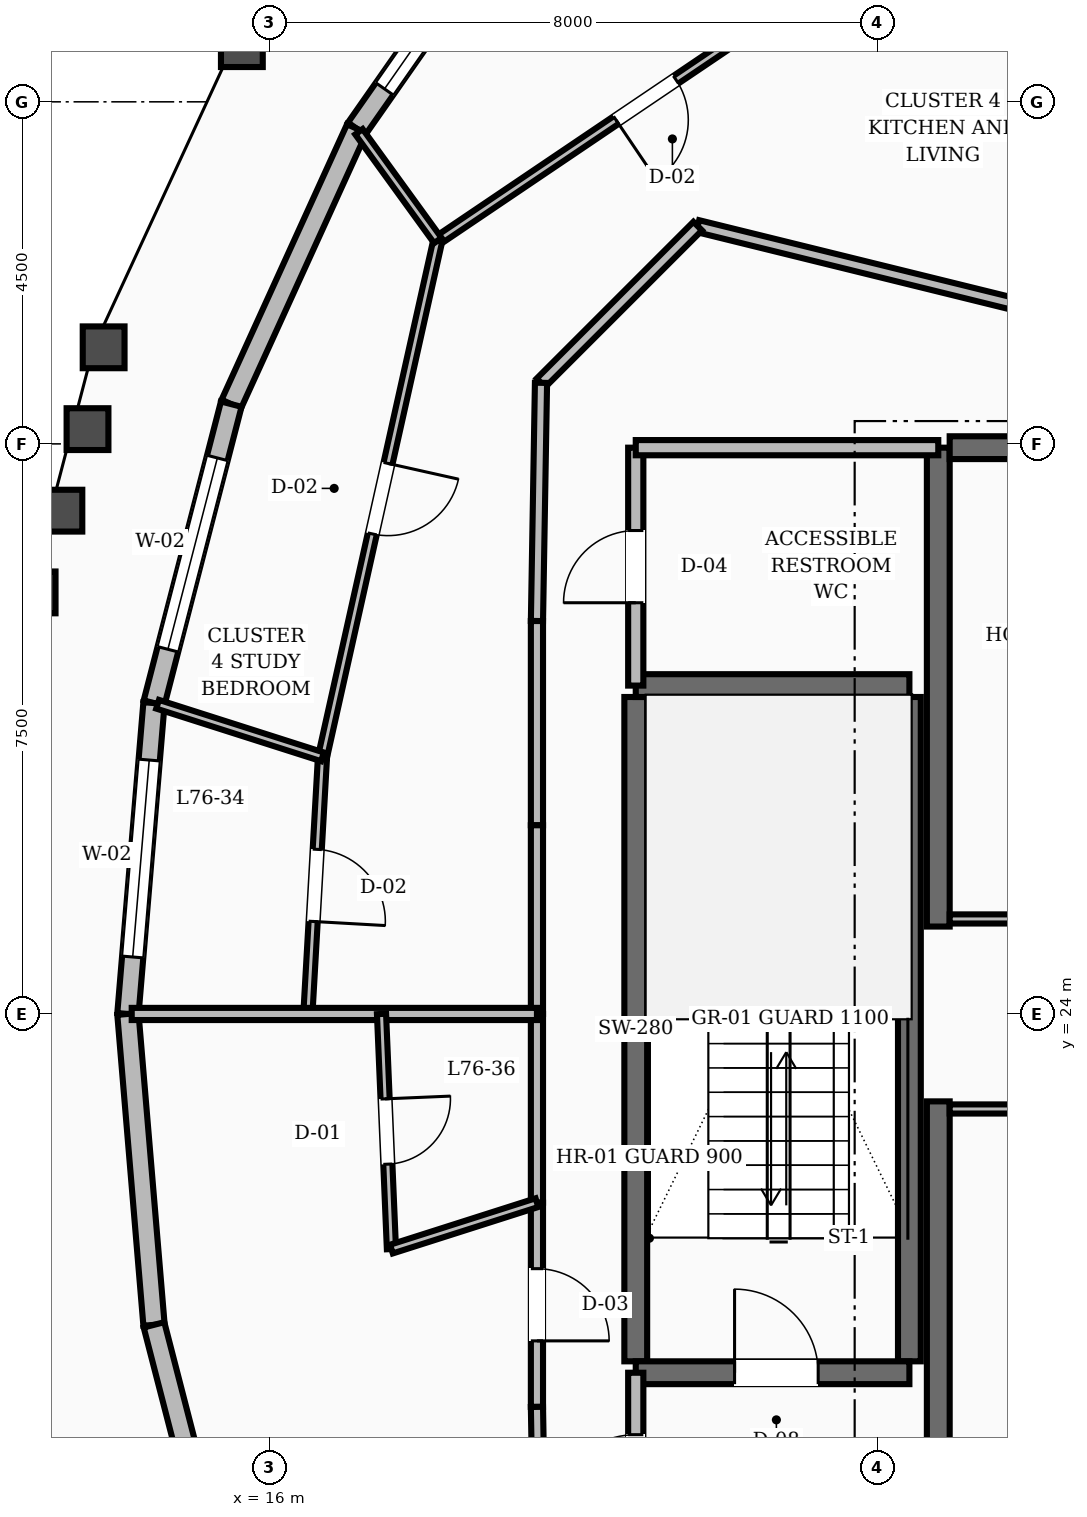
"""IFC4 building model, lengths in metres.
Left out: names, types, materials, properties, quantities, classifications, styles, units other than length and angle.
Written with IfcOpenShell. Run it as: python <this file> out.ifc"""

import sys

from ifc_helpers import new_model, si_unit, direction, frame, frame_2d, origin, place, context, subcontext, project, spatial, rectangle, extrude, element, fill, save


model = new_model("IFC4")
c1 = context("Model", 3, precision=1e-05, world=origin(), true_north=direction((0.0, 1.0)))
c2 = subcontext(c1, "Body", "Model", "MODEL_VIEW")
j1 = project(units=[si_unit("LENGTHUNIT", "METRE"), si_unit("PLANEANGLEUNIT", "RADIAN")], contexts=[c1])
p1 = place(None, origin())
s1 = spatial("IfcSite", under=j1, at=p1, CompositionType="ELEMENT")
p2 = place(p1, origin())
s2 = spatial("IfcBuilding", under=s1, at=p2, CompositionType="ELEMENT")
p3 = place(p2, frame((0.0, 0.0, 290.4)))
s3 = spatial("IfcBuildingStorey", under=s2, at=p3, CompositionType="ELEMENT", Elevation=290.4)
for number, where, z_axis, x_axis in (
    (1, (24.8, 16.55, 0.0), (0.0, 0.0, 1.0), (0.0, 1.0, 0.0)),
    (2, (24.8, 25.15, 0.0), (0.0, 0.0, 1.0), (0.0, 1.0, 0.0)),
):
    element("IfcWall", number, at=place(p3, frame(where, z_axis=z_axis, x_axis=x_axis)), inside=s3, PredefinedType="SHEAR", context=c2, shape_type="SweptSolid", body=[
        extrude(rectangle(XDim=6.3, YDim=0.3, at=frame_2d((3.15, 0.0))), origin(), (0.0, 0.0, 1.0), 3.6),
    ])
p4 = place(p3, frame((24.95, 31.45, 0.0), z_axis=(0.0, 0.0, 1.0), x_axis=(1.0, 0.0, 0.0)))
e3 = element("IfcWall", 3, at=p4, inside=s3, PredefinedType="SHEAR", context=c2, shape_type="SweptSolid", body=[
    extrude(rectangle(XDim=3.25, YDim=0.3, at=frame_2d((1.625, 0.0))), origin(), (0.0, 0.0, 1.0), 3.6),
])
for number, where, z_axis, x_axis in (
    (4, (20.82, 19.43, 0.0), (0.0, 0.0, 1.0), (0.0, 1.0, 0.0)),
    (5, (24.42, 19.43, 0.0), (0.0, 0.0, 1.0), (0.0, 1.0, 0.0)),
):
    element("IfcWall", number, at=place(p3, frame(where, z_axis=z_axis, x_axis=x_axis)), inside=s3, PredefinedType="SHEAR", context=c2, shape_type="SweptSolid", body=[
        extrude(rectangle(XDim=8.74, YDim=0.3, at=frame_2d((4.37, 0.0))), origin(), (0.0, 0.0, 1.0), 3.6),
    ])
p5 = place(p3, frame((20.82, 19.28, 0.0), z_axis=(0.0, 0.0, 1.0), x_axis=(1.0, 0.0, 0.0)))
e6 = element("IfcWall", 6, at=p5, inside=s3, PredefinedType="SHEAR", context=c2, shape_type="SweptSolid", body=[
    extrude(rectangle(XDim=3.6, YDim=0.3, at=frame_2d((1.8, 0.0))), origin(), (0.0, 0.0, 1.0), 3.6),
])
p6 = place(p5, frame((1.3, 0.0, 0.0)))
e7 = element("IfcOpeningElement", 7, at=p6, cuts=e6, PredefinedType="OPENING", context=c2, shape_type="SweptSolid", body=[
    extrude(rectangle(XDim=1.1, YDim=2.1, at=frame_2d((0.55, 1.05))), frame((0.0, 0.16, 0.0), z_axis=(0.0, -1.0, 0.0), x_axis=(1.0, 0.0, 0.0)), (0.0, 0.0, 1.0), 0.32),
])
p7 = place(p3, frame((20.82, 28.32, 0.0), z_axis=(0.0, 0.0, 1.0), x_axis=(1.0, 0.0, 0.0)))
e8 = element("IfcWall", 8, at=p7, inside=s3, PredefinedType="SHEAR", context=c2, shape_type="SweptSolid", body=[
    extrude(rectangle(XDim=3.6, YDim=0.3, at=frame_2d((1.8, 0.0))), origin(), (0.0, 0.0, 1.0), 3.6),
])
p8 = place(p3, frame((19.37, 38.824, 0.0), z_axis=(0.0, 0.0, 1.0), x_axis=(-0.573022646369, -0.819539533365, 0.0)))
e9 = element("IfcWall", 9, at=p8, inside=s3, PredefinedType="STANDARD", context=c2, shape_type="SweptSolid", body=[
    extrude(rectangle(XDim=3.876, YDim=0.28, at=frame_2d((1.938, 0.0))), origin(), (0.0, 0.0, 1.0), 2.88),
])
p9 = place(p8, frame((0.638, 0.0, 0.8)))
e10 = element("IfcOpeningElement", 10, at=p9, cuts=e9, PredefinedType="OPENING", context=c2, shape_type="SweptSolid", body=[
    extrude(rectangle(XDim=2.6, YDim=1.65, at=frame_2d((1.3, 0.825))), frame((0.0, 0.15, 0.0), z_axis=(0.0, -1.0, 0.0), x_axis=(1.0, 0.0, 0.0)), (0.0, 0.0, 1.0), 0.3),
])
p10 = place(p3, frame((17.149, 35.647, 0.0), z_axis=(0.0, 0.0, 1.0), x_axis=(-0.414454053433, -0.910070237725, 0.0)))
e11 = element("IfcWall", 11, at=p10, inside=s3, PredefinedType="STANDARD", context=c2, shape_type="SweptSolid", body=[
    extrude(rectangle(XDim=3.983, YDim=0.28, at=frame_2d((1.991, 0.0))), origin(), (0.0, 0.0, 1.0), 2.88),
])
p11 = place(p3, frame((15.498, 32.023, 0.0), z_axis=(0.0, 0.0, 1.0), x_axis=(-0.250207014881, -0.968192361932, 0.0)))
e12 = element("IfcWall", 12, at=p11, inside=s3, PredefinedType="STANDARD", context=c2, shape_type="SweptSolid", body=[
    extrude(rectangle(XDim=4.062, YDim=0.28, at=frame_2d((2.031, 0.0))), origin(), (0.0, 0.0, 1.0), 2.88),
])
p12 = place(p11, frame((0.731, 0.0, 0.8)))
e13 = element("IfcOpeningElement", 13, at=p12, cuts=e12, PredefinedType="OPENING", context=c2, shape_type="SweptSolid", body=[
    extrude(rectangle(XDim=2.6, YDim=1.65, at=frame_2d((1.3, 0.825))), frame((0.0, 0.15, 0.0), z_axis=(0.0, -1.0, 0.0), x_axis=(1.0, 0.0, 0.0)), (0.0, 0.0, 1.0), 0.3),
])
p13 = place(p3, frame((14.482, 28.09, 0.0), z_axis=(0.0, 0.0, 1.0), x_axis=(-0.083636215003, -0.996496354002, 0.0)))
e14 = element("IfcWall", 14, at=p13, inside=s3, PredefinedType="STANDARD", context=c2, shape_type="SweptSolid", body=[
    extrude(rectangle(XDim=4.104, YDim=0.28, at=frame_2d((2.052, 0.0))), origin(), (0.0, 0.0, 1.0), 2.88),
])
p14 = place(p13, frame((0.752, 0.0, 0.8)))
e15 = element("IfcOpeningElement", 15, at=p14, cuts=e14, PredefinedType="OPENING", context=c2, shape_type="SweptSolid", body=[
    extrude(rectangle(XDim=2.6, YDim=1.65, at=frame_2d((1.3, 0.825))), frame((0.0, 0.15, 0.0), z_axis=(0.0, -1.0, 0.0), x_axis=(1.0, 0.0, 0.0)), (0.0, 0.0, 1.0), 0.3),
])
p15 = place(p3, frame((14.139, 24.0, 0.0), z_axis=(0.0, 0.0, 1.0), x_axis=(0.083636215003, -0.996496354002, 0.0)))
e16 = element("IfcWall", 16, at=p15, inside=s3, PredefinedType="STANDARD", context=c2, shape_type="SweptSolid", body=[
    extrude(rectangle(XDim=4.104, YDim=0.28, at=frame_2d((2.052, 0.0))), origin(), (0.0, 0.0, 1.0), 2.88),
])
p16 = place(p3, frame((14.482, 19.91, 0.0), z_axis=(0.0, 0.0, 1.0), x_axis=(0.250207014881, -0.968192361932, 0.0)))
e17 = element("IfcWall", 17, at=p16, inside=s3, PredefinedType="STANDARD", context=c2, shape_type="SweptSolid", body=[
    extrude(rectangle(XDim=4.062, YDim=0.28, at=frame_2d((2.031, 0.0))), origin(), (0.0, 0.0, 1.0), 2.88),
])
p17 = place(p3, frame((20.82, 16.55, 0.0), z_axis=(0.0, 0.0, 1.0), x_axis=(0.0, 1.0, 0.0)))
e18 = element("IfcWall", 18, at=p17, inside=s3, PredefinedType="SOLIDWALL", context=c2, shape_type="SweptSolid", body=[
    extrude(rectangle(XDim=2.73, YDim=0.2, at=frame_2d((1.365, 0.0))), origin(), (0.0, 0.0, 1.0), 2.87),
])
p18 = place(p17, frame((0.815, 0.0, 0.0)))
e19 = element("IfcOpeningElement", 19, at=p18, cuts=e18, PredefinedType="OPENING", context=c2, shape_type="SweptSolid", body=[
    extrude(rectangle(XDim=1.1, YDim=2.1, at=frame_2d((0.55, 1.05))), frame((0.0, 0.11, 0.0), z_axis=(0.0, -1.0, 0.0), x_axis=(1.0, 0.0, 0.0)), (0.0, 0.0, 1.0), 0.22),
])
p19 = place(p3, frame((20.82, 28.32, 0.0), z_axis=(0.0, 0.0, 1.0), x_axis=(0.0, 1.0, 0.0)))
e20 = element("IfcWall", 20, at=p19, inside=s3, PredefinedType="SOLIDWALL", context=c2, shape_type="SweptSolid", body=[
    extrude(rectangle(XDim=3.13, YDim=0.2, at=frame_2d((1.565, 0.0))), origin(), (0.0, 0.0, 1.0), 2.87),
])
p20 = place(p19, frame((1.09, 0.0, 0.0)))
e21 = element("IfcOpeningElement", 21, at=p20, cuts=e20, PredefinedType="OPENING", context=c2, shape_type="SweptSolid", body=[
    extrude(rectangle(XDim=0.95, YDim=2.1, at=frame_2d((0.475, 1.05))), frame((0.0, 0.11, 0.0), z_axis=(0.0, -1.0, 0.0), x_axis=(1.0, 0.0, 0.0)), (0.0, 0.0, 1.0), 0.22),
])
p21 = place(p3, frame((20.82, 31.45, 0.0), z_axis=(0.0, 0.0, 1.0), x_axis=(1.0, 0.0, 0.0)))
e22 = element("IfcWall", 22, at=p21, inside=s3, PredefinedType="SOLIDWALL", context=c2, shape_type="SweptSolid", body=[
    extrude(rectangle(XDim=3.98, YDim=0.2, at=frame_2d((1.99, 0.0))), origin(), (0.0, 0.0, 1.0), 2.87),
])
p22 = place(p3, frame((24.95, 25.25, 0.0), z_axis=(0.0, 0.0, 1.0), x_axis=(1.0, 0.0, 0.0)))
e23 = element("IfcWall", 23, at=p22, inside=s3, PredefinedType="PARTITIONING", context=c2, shape_type="SweptSolid", body=[
    extrude(rectangle(XDim=3.2, YDim=0.12, at=frame_2d((1.6, 0.0))), origin(), (0.0, 0.0, 1.0), 2.87),
])
p23 = place(p22, frame((1.125, 0.0, 0.0)))
e24 = element("IfcOpeningElement", 24, at=p23, cuts=e23, PredefinedType="OPENING", context=c2, shape_type="SweptSolid", body=[
    extrude(rectangle(XDim=0.95, YDim=2.1, at=frame_2d((0.475, 1.05))), frame((0.0, 0.07, 0.0), z_axis=(0.0, -1.0, 0.0), x_axis=(1.0, 0.0, 0.0)), (0.0, 0.0, 1.0), 0.14),
])
p24 = place(p3, frame((24.95, 22.75, 0.0), z_axis=(0.0, 0.0, 1.0), x_axis=(1.0, 0.0, 0.0)))
e25 = element("IfcWall", 25, at=p24, inside=s3, PredefinedType="PARTITIONING", context=c2, shape_type="SweptSolid", body=[
    extrude(rectangle(XDim=3.2, YDim=0.12, at=frame_2d((1.6, 0.0))), origin(), (0.0, 0.0, 1.0), 2.87),
])
p25 = place(p24, frame((1.125, 0.0, 0.0)))
e26 = element("IfcOpeningElement", 26, at=p25, cuts=e25, PredefinedType="OPENING", context=c2, shape_type="SweptSolid", body=[
    extrude(rectangle(XDim=0.95, YDim=2.1, at=frame_2d((0.475, 1.05))), frame((0.0, 0.07, 0.0), z_axis=(0.0, -1.0, 0.0), x_axis=(1.0, 0.0, 0.0)), (0.0, 0.0, 1.0), 0.14),
])
p26 = place(p3, frame((25.752, 33.35, 0.0), z_axis=(0.0, 0.0, 1.0), x_axis=(-0.970939799552, 0.239323850978, 0.0)))
e27 = element("IfcWall", 27, at=p26, inside=s3, PredefinedType="SOLIDWALL", context=c2, shape_type="SweptSolid", body=[
    extrude(rectangle(XDim=4.241, YDim=0.16, at=frame_2d((2.12, 0.0))), origin(), (0.0, 0.0, 1.0), 2.87),
])
p27 = place(p3, frame((21.635, 34.365, 0.0), z_axis=(0.0, 0.0, 1.0), x_axis=(-0.707106781187, -0.707106781187, 0.0)))
e28 = element("IfcWall", 28, at=p27, inside=s3, PredefinedType="SOLIDWALL", context=c2, shape_type="SweptSolid", body=[
    extrude(rectangle(XDim=2.916, YDim=0.16, at=frame_2d((1.458, 0.0))), origin(), (0.0, 0.0, 1.0), 2.87),
])
p28 = place(p3, frame((19.573, 32.303, 0.0), z_axis=(0.0, 0.0, 1.0), x_axis=(-0.016981035134, -0.999855811828, 0.0)))
e29 = element("IfcWall", 29, at=p28, inside=s3, PredefinedType="SOLIDWALL", context=c2, shape_type="SweptSolid", body=[
    extrude(rectangle(XDim=3.134, YDim=0.16, at=frame_2d((1.567, 0.0))), origin(), (0.0, 0.0, 1.0), 2.87),
])
p29 = place(p3, frame((19.52, 29.169, 0.0), z_axis=(0.0, 0.0, 1.0), x_axis=(0.0, -1.0, 0.0)))
e30 = element("IfcWall", 30, at=p29, inside=s3, PredefinedType="SOLIDWALL", context=c2, shape_type="SweptSolid", body=[
    extrude(rectangle(XDim=2.687, YDim=0.16, at=frame_2d((1.344, 0.0))), origin(), (0.0, 0.0, 1.0), 2.87),
])
for number, where, z_axis, x_axis in (
    (31, (19.52, 26.482, 0.0), (0.0, 0.0, 1.0), (0.0, -1.0, 0.0)),
    (32, (19.52, 24.0, 0.0), (0.0, 0.0, 1.0), (0.0, -1.0, 0.0)),
):
    element("IfcWall", number, at=place(p3, frame(where, z_axis=z_axis, x_axis=x_axis)), inside=s3, PredefinedType="SOLIDWALL", context=c2, shape_type="SweptSolid", body=[
        extrude(rectangle(XDim=2.482, YDim=0.16, at=frame_2d((1.241, 0.0))), origin(), (0.0, 0.0, 1.0), 2.87),
    ])
p30 = place(p3, frame((19.52, 21.518, 0.0), z_axis=(0.0, 0.0, 1.0), x_axis=(0.0, -1.0, 0.0)))
e33 = element("IfcWall", 33, at=p30, inside=s3, PredefinedType="SOLIDWALL", context=c2, shape_type="SweptSolid", body=[
    extrude(rectangle(XDim=2.687, YDim=0.16, at=frame_2d((1.344, 0.0))), origin(), (0.0, 0.0, 1.0), 2.87),
])
p31 = place(p30, frame((0.868, 0.0, 0.0)))
e34 = element("IfcOpeningElement", 34, at=p31, cuts=e33, PredefinedType="OPENING", context=c2, shape_type="SweptSolid", body=[
    extrude(rectangle(XDim=0.95, YDim=2.1, at=frame_2d((0.475, 1.05))), frame((0.0, 0.09, 0.0), z_axis=(0.0, -1.0, 0.0), x_axis=(1.0, 0.0, 0.0)), (0.0, 0.0, 1.0), 0.18),
])
p32 = place(p3, frame((19.52, 18.831, 0.0), z_axis=(0.0, 0.0, 1.0), x_axis=(0.016981035134, -0.999855811828, 0.0)))
e35 = element("IfcWall", 35, at=p32, inside=s3, PredefinedType="SOLIDWALL", context=c2, shape_type="SweptSolid", body=[
    extrude(rectangle(XDim=3.134, YDim=0.16, at=frame_2d((1.567, 0.0))), origin(), (0.0, 0.0, 1.0), 2.87),
])
p33 = place(p3, frame((23.694, 37.875, 0.0), z_axis=(0.0, 0.0, 1.0), x_axis=(-0.82872877639, -0.55965044017, 0.0)))
e36 = element("IfcWall", 36, at=p33, inside=s3, PredefinedType="PARTITIONING", context=c2, shape_type="SweptSolid", body=[
    extrude(rectangle(XDim=6.611, YDim=0.12, at=frame_2d((3.305, 0.0))), origin(), (0.0, 0.0, 1.0), 2.87),
])
p34 = place(p33, frame((2.83, 0.0, 0.0)))
e37 = element("IfcOpeningElement", 37, at=p34, cuts=e36, PredefinedType="OPENING", context=c2, shape_type="SweptSolid", body=[
    extrude(rectangle(XDim=0.95, YDim=2.1, at=frame_2d((0.475, 1.05))), frame((0.0, 0.07, 0.0), z_axis=(0.0, -1.0, 0.0), x_axis=(1.0, 0.0, 0.0)), (0.0, 0.0, 1.0), 0.14),
])
p35 = place(p3, frame((18.216, 34.176, 0.0), z_axis=(0.0, 0.0, 1.0), x_axis=(-0.217921941181, -0.975966202054, 0.0)))
e38 = element("IfcWall", 38, at=p35, inside=s3, PredefinedType="PARTITIONING", context=c2, shape_type="SweptSolid", body=[
    extrude(rectangle(XDim=6.96, YDim=0.12, at=frame_2d((3.48, 0.0))), origin(), (0.0, 0.0, 1.0), 2.87),
])
p36 = place(p35, frame((3.005, 0.0, 0.0)))
e39 = element("IfcOpeningElement", 39, at=p36, cuts=e38, PredefinedType="OPENING", context=c2, shape_type="SweptSolid", body=[
    extrude(rectangle(XDim=0.95, YDim=2.1, at=frame_2d((0.475, 1.05))), frame((0.0, 0.07, 0.0), z_axis=(0.0, -1.0, 0.0), x_axis=(1.0, 0.0, 0.0)), (0.0, 0.0, 1.0), 0.14),
])
p37 = place(p3, frame((18.216, 34.176, 0.0), z_axis=(0.0, 0.0, 1.0), x_axis=(-0.586947198649, 0.809625213292, 0.0)))
e40 = element("IfcWall", 40, at=p37, inside=s3, PredefinedType="PARTITIONING", context=c2, shape_type="SweptSolid", body=[
    extrude(rectangle(XDim=1.767, YDim=0.12, at=frame_2d((0.884, 0.0))), origin(), (0.0, 0.0, 1.0), 2.87),
])
p38 = place(p3, frame((16.699, 27.383, 0.0), z_axis=(0.0, 0.0, 1.0), x_axis=(-0.056711181709, -0.998390625892, 0.0)))
e41 = element("IfcWall", 41, at=p38, inside=s3, PredefinedType="PARTITIONING", context=c2, shape_type="SweptSolid", body=[
    extrude(rectangle(XDim=3.388, YDim=0.12, at=frame_2d((1.694, 0.0))), origin(), (0.0, 0.0, 1.0), 2.87),
])
p39 = place(p38, frame((1.219, 0.0, 0.0)))
e42 = element("IfcOpeningElement", 42, at=p39, cuts=e41, PredefinedType="OPENING", context=c2, shape_type="SweptSolid", body=[
    extrude(rectangle(XDim=0.95, YDim=2.1, at=frame_2d((0.475, 1.05))), frame((0.0, 0.07, 0.0), z_axis=(0.0, -1.0, 0.0), x_axis=(1.0, 0.0, 0.0)), (0.0, 0.0, 1.0), 0.14),
])
p40 = place(p3, frame((16.699, 27.383, 0.0), z_axis=(0.0, 0.0, 1.0), x_axis=(-0.952679032729, 0.303978059402, 0.0)))
e43 = element("IfcWall", 43, at=p40, inside=s3, PredefinedType="PARTITIONING", context=c2, shape_type="SweptSolid", body=[
    extrude(rectangle(XDim=2.277, YDim=0.12, at=frame_2d((1.138, 0.0))), origin(), (0.0, 0.0, 1.0), 2.87),
])
p41 = place(p3, frame((19.52, 24.0, 0.0), z_axis=(0.0, 0.0, 1.0), x_axis=(-1.0, 0.0, 0.0)))
e44 = element("IfcWall", 44, at=p41, inside=s3, PredefinedType="SOLIDWALL", context=c2, shape_type="SweptSolid", body=[
    extrude(rectangle(XDim=5.331, YDim=0.16, at=frame_2d((2.666, 0.0))), origin(), (0.0, 0.0, 1.0), 2.87),
])
p42 = place(p3, frame((17.475, 24.0, 0.0), z_axis=(0.0, 0.0, 1.0), x_axis=(0.042109419469, -0.999113005016, 0.0)))
e45 = element("IfcWall", 45, at=p42, inside=s3, PredefinedType="PARTITIONING", context=c2, shape_type="SweptSolid", body=[
    extrude(rectangle(XDim=3.096, YDim=0.12, at=frame_2d((1.548, 0.0))), origin(), (0.0, 0.0, 1.0), 2.87),
])
p43 = place(p42, frame((1.118, 0.0, 0.0)))
e46 = element("IfcOpeningElement", 46, at=p43, cuts=e45, PredefinedType="OPENING", context=c2, shape_type="SweptSolid", body=[
    extrude(rectangle(XDim=0.86, YDim=2.1, at=frame_2d((0.43, 1.05))), frame((0.0, 0.07, 0.0), z_axis=(0.0, -1.0, 0.0), x_axis=(1.0, 0.0, 0.0)), (0.0, 0.0, 1.0), 0.14),
])
p44 = place(p3, frame((19.52, 21.518, 0.0), z_axis=(0.0, 0.0, 1.0), x_axis=(-0.952686159799, -0.303955721986, 0.0)))
e47 = element("IfcWall", 47, at=p44, inside=s3, PredefinedType="PARTITIONING", context=c2, shape_type="SweptSolid", body=[
    extrude(rectangle(XDim=2.01, YDim=0.12, at=frame_2d((1.005, 0.0))), origin(), (0.0, 0.0, 1.0), 2.87),
])
p45 = place(p9, origin())
e48 = element("IfcWindow", 48, at=p45, inside=s3, PartitioningType="SINGLE_PANEL", PredefinedType="WINDOW", context=c2, shape_type="SweptSolid", body=[
    extrude(rectangle(XDim=2.6, YDim=1.65, at=frame_2d((1.3, 0.825))), frame((0.0, 0.03, 0.0), z_axis=(0.0, -1.0, 0.0), x_axis=(1.0, 0.0, 0.0)), (0.0, 0.0, 1.0), 0.06),
])
fill(e10, e48)
p46 = place(p12, origin())
e49 = element("IfcWindow", 49, at=p46, inside=s3, PartitioningType="SINGLE_PANEL", PredefinedType="WINDOW", context=c2, shape_type="SweptSolid", body=[
    extrude(rectangle(XDim=2.6, YDim=1.65, at=frame_2d((1.3, 0.825))), frame((0.0, 0.03, 0.0), z_axis=(0.0, -1.0, 0.0), x_axis=(1.0, 0.0, 0.0)), (0.0, 0.0, 1.0), 0.06),
])
fill(e13, e49)
p47 = place(p14, origin())
e50 = element("IfcWindow", 50, at=p47, inside=s3, PartitioningType="SINGLE_PANEL", PredefinedType="WINDOW", context=c2, shape_type="SweptSolid", body=[
    extrude(rectangle(XDim=2.6, YDim=1.65, at=frame_2d((1.3, 0.825))), frame((0.0, 0.03, 0.0), z_axis=(0.0, -1.0, 0.0), x_axis=(1.0, 0.0, 0.0)), (0.0, 0.0, 1.0), 0.06),
])
fill(e15, e50)
p48 = place(p6, origin())
e51 = element("IfcDoor", 51, at=p48, inside=s3, OperationType="SINGLE_SWING_LEFT", PredefinedType="DOOR", context=c2, shape_type="SweptSolid", body=[
    extrude(rectangle(XDim=1.1, YDim=2.1, at=frame_2d((0.55, 1.05))), frame((0.0, 0.025, 0.0), z_axis=(0.0, -1.0, 0.0), x_axis=(1.0, 0.0, 0.0)), (0.0, 0.0, 1.0), 0.05),
])
fill(e7, e51)
p49 = place(p18, origin())
e52 = element("IfcDoor", 52, at=p49, inside=s3, OperationType="SINGLE_SWING_LEFT", PredefinedType="DOOR", context=c2, shape_type="SweptSolid", body=[
    extrude(rectangle(XDim=1.1, YDim=2.1, at=frame_2d((0.55, 1.05))), frame((0.0, 0.025, 0.0), z_axis=(0.0, -1.0, 0.0), x_axis=(1.0, 0.0, 0.0)), (0.0, 0.0, 1.0), 0.05),
])
fill(e19, e52)
p50 = place(p20, origin())
e53 = element("IfcDoor", 53, at=p50, inside=s3, OperationType="SINGLE_SWING_LEFT", PredefinedType="DOOR", context=c2, shape_type="SweptSolid", body=[
    extrude(rectangle(XDim=0.95, YDim=2.1, at=frame_2d((0.475, 1.05))), frame((0.0, 0.025, 0.0), z_axis=(0.0, -1.0, 0.0), x_axis=(1.0, 0.0, 0.0)), (0.0, 0.0, 1.0), 0.05),
])
fill(e21, e53)
p51 = place(p34, origin())
e54 = element("IfcDoor", 54, at=p51, inside=s3, OperationType="SINGLE_SWING_RIGHT", PredefinedType="DOOR", context=c2, shape_type="SweptSolid", body=[
    extrude(rectangle(XDim=0.95, YDim=2.1, at=frame_2d((0.475, 1.05))), frame((0.0, 0.025, 0.0), z_axis=(0.0, -1.0, 0.0), x_axis=(1.0, 0.0, 0.0)), (0.0, 0.0, 1.0), 0.05),
])
fill(e37, e54)
p52 = place(p36, origin())
e55 = element("IfcDoor", 55, at=p52, inside=s3, OperationType="SINGLE_SWING_LEFT", PredefinedType="DOOR", context=c2, shape_type="SweptSolid", body=[
    extrude(rectangle(XDim=0.95, YDim=2.1, at=frame_2d((0.475, 1.05))), frame((0.0, 0.025, 0.0), z_axis=(0.0, -1.0, 0.0), x_axis=(1.0, 0.0, 0.0)), (0.0, 0.0, 1.0), 0.05),
])
fill(e39, e55)
p53 = place(p39, origin())
e56 = element("IfcDoor", 56, at=p53, inside=s3, OperationType="SINGLE_SWING_RIGHT", PredefinedType="DOOR", context=c2, shape_type="SweptSolid", body=[
    extrude(rectangle(XDim=0.95, YDim=2.1, at=frame_2d((0.475, 1.05))), frame((0.0, 0.025, 0.0), z_axis=(0.0, -1.0, 0.0), x_axis=(1.0, 0.0, 0.0)), (0.0, 0.0, 1.0), 0.05),
])
fill(e42, e56)
p54 = place(p43, origin())
e57 = element("IfcDoor", 57, at=p54, inside=s3, OperationType="SINGLE_SWING_LEFT", PredefinedType="DOOR", context=c2, shape_type="SweptSolid", body=[
    extrude(rectangle(XDim=0.86, YDim=2.1, at=frame_2d((0.43, 1.05))), frame((0.0, 0.025, 0.0), z_axis=(0.0, -1.0, 0.0), x_axis=(1.0, 0.0, 0.0)), (0.0, 0.0, 1.0), 0.05),
])
fill(e46, e57)
p55 = place(p31, origin())
e58 = element("IfcDoor", 58, at=p55, inside=s3, OperationType="SINGLE_SWING_RIGHT", PredefinedType="DOOR", context=c2, shape_type="SweptSolid", body=[
    extrude(rectangle(XDim=0.95, YDim=2.1, at=frame_2d((0.475, 1.05))), frame((0.0, 0.025, 0.0), z_axis=(0.0, -1.0, 0.0), x_axis=(1.0, 0.0, 0.0)), (0.0, 0.0, 1.0), 0.05),
])
fill(e34, e58)
save(model, sys.argv[1])
